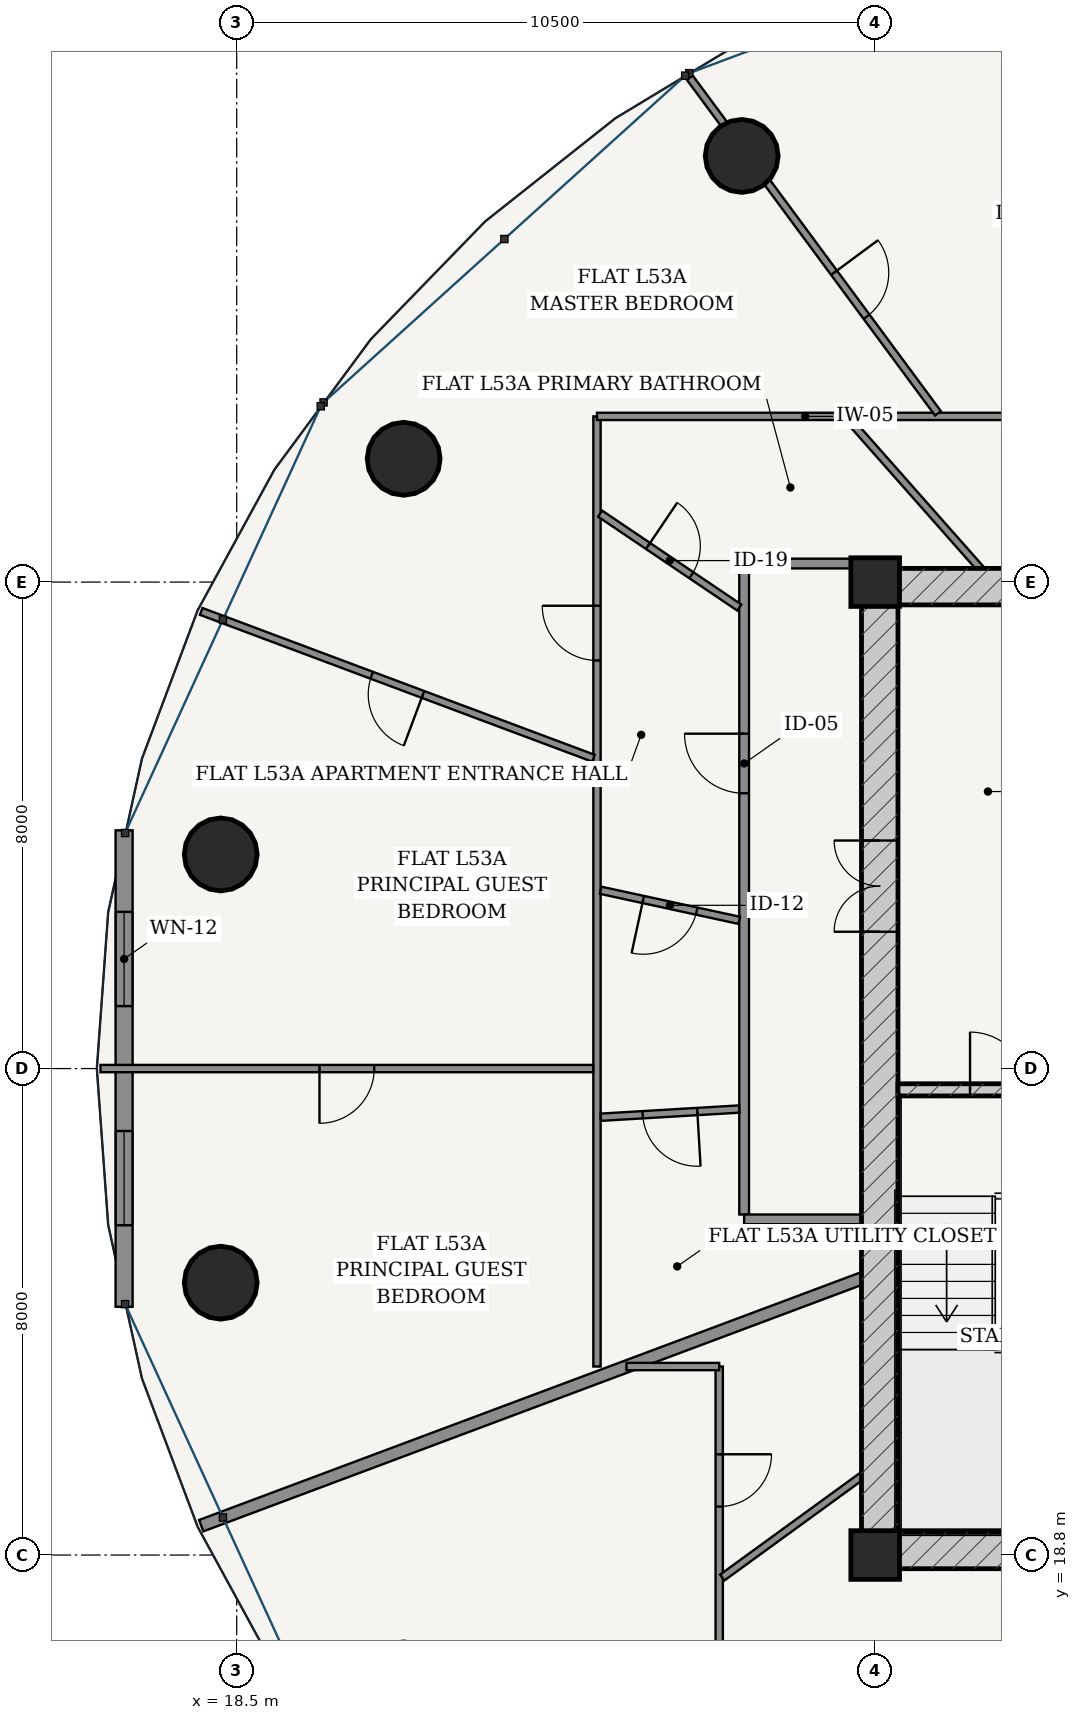
"""IFC4 building model, lengths in metres.
Left out: names, types, materials, properties, quantities, classifications, styles, units other than length and angle.
Written with IfcOpenShell. Run it as: python <this file> out.ifc"""

import sys

from ifc_helpers import new_model, si_unit, direction, frame, frame_2d, origin, origin_2d, place, context, subcontext, project, spatial, rectangle, hollow_circle, extrude, source, transform, mapped, element, fill, save


model = new_model("IFC4")
c1 = context("Model", 3, precision=1e-05, world=origin(), true_north=direction((-0.2419218956, 0.970295726276)))
c2 = subcontext(c1, "Body", "Model", "MODEL_VIEW")
j1 = project(units=[si_unit("LENGTHUNIT", "METRE"), si_unit("PLANEANGLEUNIT", "RADIAN")], contexts=[c1])
p1 = place(None, origin())
s1 = spatial("IfcSite", under=j1, at=p1, CompositionType="ELEMENT")
p2 = place(p1, origin())
s2 = spatial("IfcBuilding", under=s1, at=p2, CompositionType="ELEMENT")
p3 = place(p2, frame((0.0, 0.0, 202.3)))
s3 = spatial("IfcBuildingStorey", under=s2, at=p3, CompositionType="ELEMENT", Elevation=202.3)
for number, where, z_axis, x_axis in (
    (1, (29.0, 18.8, 0.0), (0.0, 0.0, 1.0), (1.0, 0.0, 0.0)),
    (2, (29.0, 34.8, 0.0), (0.0, 0.0, 1.0), (1.0, 0.0, 0.0)),
):
    element("IfcColumn", number, at=place(p3, frame(where, z_axis=z_axis, x_axis=x_axis)), inside=s3, PredefinedType="COLUMN", context=c2, shape_type="SweptSolid", body=[
        extrude(rectangle(XDim=0.8, YDim=0.8, at=origin_2d()), origin(), (0.0, 0.0, 1.0), 3.7),
    ])
p4 = place(p3, frame((28.775, 18.875, 0.0), z_axis=(0.0, 0.0, 1.0), x_axis=(1.0, 0.0, 0.0)))
e3 = element("IfcWall", 3, at=p4, inside=s3, PredefinedType="SHEAR", context=c2, shape_type="SweptSolid", body=[
    extrude(rectangle(XDim=18.45, YDim=0.6, at=frame_2d((9.225, 0.0))), origin(), (0.0, 0.0, 1.0), 3.435),
])
p5 = place(p4, frame((6.76, 0.0, 0.0)))
e4 = element("IfcOpeningElement", 4, at=p5, cuts=e3, PredefinedType="OPENING", context=c2, shape_type="SweptSolid", body=[
    extrude(rectangle(XDim=0.85, YDim=2.1, at=frame_2d((0.425, 1.05))), frame((0.0, 0.31, 0.0), z_axis=(0.0, -1.0, 0.0), x_axis=(1.0, 0.0, 0.0)), (0.0, 0.0, 1.0), 0.62),
])
p6 = place(p4, frame((8.8, 0.0, 0.0)))
e5 = element("IfcOpeningElement", 5, at=p6, cuts=e3, PredefinedType="OPENING", context=c2, shape_type="SweptSolid", body=[
    extrude(rectangle(XDim=0.85, YDim=2.1, at=frame_2d((0.425, 1.05))), frame((0.0, 0.31, 0.0), z_axis=(0.0, -1.0, 0.0), x_axis=(1.0, 0.0, 0.0)), (0.0, 0.0, 1.0), 0.62),
])
p7 = place(p4, frame((10.84, 0.0, 0.0)))
e6 = element("IfcOpeningElement", 6, at=p7, cuts=e3, PredefinedType="OPENING", context=c2, shape_type="SweptSolid", body=[
    extrude(rectangle(XDim=0.85, YDim=2.1, at=frame_2d((0.425, 1.05))), frame((0.0, 0.31, 0.0), z_axis=(0.0, -1.0, 0.0), x_axis=(1.0, 0.0, 0.0)), (0.0, 0.0, 1.0), 0.62),
])
p8 = place(p3, frame((28.775, 34.725, 0.0), z_axis=(0.0, 0.0, 1.0), x_axis=(1.0, 0.0, 0.0)))
e7 = element("IfcWall", 7, at=p8, inside=s3, PredefinedType="SHEAR", context=c2, shape_type="SweptSolid", body=[
    extrude(rectangle(XDim=18.45, YDim=0.6, at=frame_2d((9.225, 0.0))), origin(), (0.0, 0.0, 1.0), 3.435),
])
p9 = place(p3, frame((29.075, 19.175, 0.0), z_axis=(0.0, 0.0, 1.0), x_axis=(0.0, 1.0, 0.0)))
e8 = element("IfcWall", 8, at=p9, inside=s3, PredefinedType="SHEAR", context=c2, shape_type="SweptSolid", body=[
    extrude(rectangle(XDim=15.25, YDim=0.6, at=frame_2d((7.625, 0.0))), origin(), (0.0, 0.0, 1.0), 3.435),
])
p10 = place(p9, frame((9.875, 0.0, 0.0)))
e9 = element("IfcOpeningElement", 9, at=p10, cuts=e8, PredefinedType="OPENING", context=c2, shape_type="SweptSolid", body=[
    extrude(rectangle(XDim=1.5, YDim=2.2, at=frame_2d((0.75, 1.1))), frame((0.0, 0.31, 0.0), z_axis=(0.0, -1.0, 0.0), x_axis=(1.0, 0.0, 0.0)), (0.0, 0.0, 1.0), 0.62),
])
p11 = place(p3, frame((29.375, 26.45, 0.0), z_axis=(0.0, 0.0, 1.0), x_axis=(1.0, 0.0, 0.0)))
e10 = element("IfcWall", 10, at=p11, inside=s3, PredefinedType="SOLIDWALL", context=c2, shape_type="SweptSolid", body=[
    extrude(rectangle(XDim=3.32, YDim=0.2, at=frame_2d((1.66, 0.0))), origin(), (0.0, 0.0, 1.0), 3.435),
])
p12 = place(p11, frame((1.185, 0.0, 0.0)))
e11 = element("IfcOpeningElement", 11, at=p12, cuts=e10, PredefinedType="OPENING", context=c2, shape_type="SweptSolid", body=[
    extrude(rectangle(XDim=0.95, YDim=2.15, at=frame_2d((0.475, 1.075))), frame((0.0, 0.11, 0.0), z_axis=(0.0, -1.0, 0.0), x_axis=(1.0, 0.0, 0.0)), (0.0, 0.0, 1.0), 0.22),
])
for number, where, z_axis, x_axis in (
    (12, (26.805, 41.808, 0.0), (0.0, 0.0, 1.0), (1.0, 0.0, 0.0)),
    (13, (21.246, 36.828, 0.0), (0.0, 0.0, 1.0), (1.0, 0.0, 0.0)),
    (14, (18.237, 30.321, 0.0), (0.0, 0.0, 1.0), (1.0, 0.0, 0.0)),
    (15, (18.237, 23.279, 0.0), (0.0, 0.0, 1.0), (1.0, 0.0, 0.0)),
):
    element("IfcColumn", number, at=place(p3, frame(where, z_axis=z_axis, x_axis=x_axis)), inside=s3, PredefinedType="COLUMN", context=c2, shape_type="SweptSolid", body=[
        extrude(hollow_circle(Radius=0.6, WallThickness=0.038, at=origin_2d()), origin(), (0.0, 0.0, 1.0), 3.7),
    ])
p13 = place(p3, frame((16.648, 30.718, 0.0), z_axis=(0.0, 0.0, 1.0), x_axis=(0.0, -1.0, 0.0)))
e16 = element("IfcWall", 16, at=p13, inside=s3, PredefinedType="SOLIDWALL", context=c2, shape_type="SweptSolid", body=[
    extrude(rectangle(XDim=7.835, YDim=0.28, at=frame_2d((3.917, 0.0))), origin(), (0.0, 0.0, 1.0), 3.435),
])
p14 = place(p13, frame((1.34, 0.0, 0.85)))
e17 = element("IfcOpeningElement", 17, at=p14, cuts=e16, PredefinedType="OPENING", context=c2, shape_type="SweptSolid", body=[
    extrude(rectangle(XDim=1.55, YDim=1.95, at=frame_2d((0.775, 0.975))), frame((0.0, 0.15, 0.0), z_axis=(0.0, -1.0, 0.0), x_axis=(1.0, 0.0, 0.0)), (0.0, 0.0, 1.0), 0.3),
])
p15 = place(p13, frame((4.944, 0.0, 0.85)))
e18 = element("IfcOpeningElement", 18, at=p15, cuts=e16, PredefinedType="OPENING", context=c2, shape_type="SweptSolid", body=[
    extrude(rectangle(XDim=1.55, YDim=1.95, at=frame_2d((0.775, 0.975))), frame((0.0, 0.15, 0.0), z_axis=(0.0, -1.0, 0.0), x_axis=(1.0, 0.0, 0.0)), (0.0, 0.0, 1.0), 0.3),
])
p16 = place(p3, frame((26.845, 24.4, 0.0), z_axis=(0.0, 0.0, 1.0), x_axis=(0.0, 1.0, 0.0)))
e19 = element("IfcWall", 19, at=p16, inside=s3, PredefinedType="PARTITIONING", context=c2, shape_type="SweptSolid", body=[
    extrude(rectangle(XDim=10.625, YDim=0.16, at=frame_2d((5.312, 0.0))), origin(), (0.0, 0.0, 1.0), 2.951),
])
p17 = place(p16, frame((6.927, 0.0, 0.0)))
e20 = element("IfcOpeningElement", 20, at=p17, cuts=e19, PredefinedType="OPENING", context=c2, shape_type="SweptSolid", body=[
    extrude(rectangle(XDim=0.98, YDim=2.2, at=frame_2d((0.49, 1.1))), frame((0.0, 0.09, 0.0), z_axis=(0.0, -1.0, 0.0), x_axis=(1.0, 0.0, 0.0)), (0.0, 0.0, 1.0), 0.18),
])
for number, where, z_axis, x_axis in (
    (21, (26.845, 35.105, 0.0), (0.0, 0.0, 1.0), (1.0, 0.0, 0.0)),
    (22, (26.845, 24.32, 0.0), (0.0, 0.0, 1.0), (1.0, 0.0, 0.0)),
):
    element("IfcWall", number, at=place(p3, frame(where, z_axis=z_axis, x_axis=x_axis)), inside=s3, PredefinedType="PARTITIONING", context=c2, shape_type="SweptSolid", body=[
        extrude(rectangle(XDim=1.93, YDim=0.16, at=frame_2d((0.965, 0.0))), origin(), (0.0, 0.0, 1.0), 3.435),
    ])
p18 = place(p3, frame((24.425, 21.9, 0.0), z_axis=(0.0, 0.0, 1.0), x_axis=(0.0, 1.0, 0.0)))
e23 = element("IfcWall", 23, at=p18, inside=s3, PredefinedType="PARTITIONING", context=c2, shape_type="SweptSolid", body=[
    extrude(rectangle(XDim=15.625, YDim=0.12, at=frame_2d((7.812, 0.0))), origin(), (0.0, 0.0, 1.0), 2.951),
])
p19 = place(p18, frame((11.611, 0.0, 0.0)))
e24 = element("IfcOpeningElement", 24, at=p19, cuts=e23, PredefinedType="OPENING", context=c2, shape_type="SweptSolid", body=[
    extrude(rectangle(XDim=0.9, YDim=2.15, at=frame_2d((0.45, 1.075))), frame((0.0, 0.07, 0.0), z_axis=(0.0, -1.0, 0.0), x_axis=(1.0, 0.0, 0.0)), (0.0, 0.0, 1.0), 0.14),
])
p20 = place(p3, frame((24.425, 37.525, 0.0), z_axis=(0.0, 0.0, 1.0), x_axis=(1.0, 0.0, 0.0)))
e25 = element("IfcWall", 25, at=p20, inside=s3, PredefinedType="PARTITIONING", context=c2, shape_type="SweptSolid", body=[
    extrude(rectangle(XDim=6.85, YDim=0.12, at=frame_2d((3.425, 0.0))), origin(), (0.0, 0.0, 1.0), 2.951),
])
p21 = place(p3, frame((30.033, 37.575, 0.0), z_axis=(0.0, 0.0, 1.0), x_axis=(-0.59452500855, 0.804077119565, 0.0)))
e26 = element("IfcWall", 26, at=p21, inside=s3, PredefinedType="PARTITIONING", context=c2, shape_type="SweptSolid", body=[
    extrude(rectangle(XDim=6.867, YDim=0.12, at=frame_2d((3.434, 0.0))), origin(), (0.0, 0.0, 1.0), 2.951),
])
p22 = place(p21, frame((1.976, 0.0, 0.0)))
e27 = element("IfcOpeningElement", 27, at=p22, cuts=e26, PredefinedType="OPENING", context=c2, shape_type="SweptSolid", body=[
    extrude(rectangle(XDim=0.9, YDim=2.15, at=frame_2d((0.45, 1.075))), frame((0.0, 0.07, 0.0), z_axis=(0.0, -1.0, 0.0), x_axis=(1.0, 0.0, 0.0)), (0.0, 0.0, 1.0), 0.14),
])
p23 = place(p3, frame((24.367, 31.903, 0.0), z_axis=(0.0, 0.0, 1.0), x_axis=(-0.936544604529, 0.350548432785, 0.0)))
e28 = element("IfcWall", 28, at=p23, inside=s3, PredefinedType="PARTITIONING", context=c2, shape_type="SweptSolid", body=[
    extrude(rectangle(XDim=6.887, YDim=0.12, at=frame_2d((3.444, 0.0))), origin(), (0.0, 0.0, 1.0), 2.951),
])
p24 = place(p23, frame((2.994, 0.0, 0.0)))
e29 = element("IfcOpeningElement", 29, at=p24, cuts=e28, PredefinedType="OPENING", context=c2, shape_type="SweptSolid", body=[
    extrude(rectangle(XDim=0.9, YDim=2.15, at=frame_2d((0.45, 1.075))), frame((0.0, 0.07, 0.0), z_axis=(0.0, -1.0, 0.0), x_axis=(1.0, 0.0, 0.0)), (0.0, 0.0, 1.0), 0.14),
])
p25 = place(p3, frame((24.363, 26.8, 0.0), z_axis=(0.0, 0.0, 1.0), x_axis=(-1.0, 0.0, 0.0)))
e30 = element("IfcWall", 30, at=p25, inside=s3, PredefinedType="PARTITIONING", context=c2, shape_type="SweptSolid", body=[
    extrude(rectangle(XDim=8.103, YDim=0.12, at=frame_2d((4.052, 0.0))), origin(), (0.0, 0.0, 1.0), 2.951),
])
p26 = place(p25, frame((3.602, 0.0, 0.0)))
e31 = element("IfcOpeningElement", 31, at=p26, cuts=e30, PredefinedType="OPENING", context=c2, shape_type="SweptSolid", body=[
    extrude(rectangle(XDim=0.9, YDim=2.15, at=frame_2d((0.45, 1.075))), frame((0.0, 0.07, 0.0), z_axis=(0.0, -1.0, 0.0), x_axis=(1.0, 0.0, 0.0)), (0.0, 0.0, 1.0), 0.14),
])
p27 = place(p3, frame((30.726, 35.027, 0.0), z_axis=(0.0, 0.0, 1.0), x_axis=(-0.662398427862, 0.749151735475, 0.0)))
e32 = element("IfcWall", 32, at=p27, inside=s3, PredefinedType="PARTITIONING", context=c2, shape_type="SweptSolid", body=[
    extrude(rectangle(XDim=3.273, YDim=0.12, at=frame_2d((1.636, 0.0))), origin(), (0.0, 0.0, 1.0), 3.435),
])
p28 = place(p3, frame((26.765, 34.381, 0.0), z_axis=(0.0, 0.0, 1.0), x_axis=(-0.828908126494, 0.55938476725, 0.0)))
e33 = element("IfcWall", 33, at=p28, inside=s3, PredefinedType="PARTITIONING", context=c2, shape_type="SweptSolid", body=[
    extrude(rectangle(XDim=2.761, YDim=0.12, at=frame_2d((1.38, 0.0))), origin(), (0.0, 0.0, 1.0), 3.11),
])
p29 = place(p28, frame((0.95, 0.0, 0.0)))
e34 = element("IfcOpeningElement", 34, at=p29, cuts=e33, PredefinedType="OPENING", context=c2, shape_type="SweptSolid", body=[
    extrude(rectangle(XDim=0.86, YDim=2.15, at=frame_2d((0.43, 1.075))), frame((0.0, 0.07, 0.0), z_axis=(0.0, -1.0, 0.0), x_axis=(1.0, 0.0, 0.0)), (0.0, 0.0, 1.0), 0.14),
])
p30 = place(p3, frame((26.765, 29.238, 0.0), z_axis=(0.0, 0.0, 1.0), x_axis=(-0.977275456013, 0.211973307458, 0.0)))
e35 = element("IfcWall", 35, at=p30, inside=s3, PredefinedType="PARTITIONING", context=c2, shape_type="SweptSolid", body=[
    extrude(rectangle(XDim=2.332, YDim=0.12, at=frame_2d((1.166, 0.0))), origin(), (0.0, 0.0, 1.0), 3.435),
])
p31 = place(p30, frame((0.716, 0.0, 0.0)))
e36 = element("IfcOpeningElement", 36, at=p31, cuts=e35, PredefinedType="OPENING", context=c2, shape_type="SweptSolid", body=[
    extrude(rectangle(XDim=0.9, YDim=2.15, at=frame_2d((0.45, 1.075))), frame((0.0, 0.07, 0.0), z_axis=(0.0, -1.0, 0.0), x_axis=(1.0, 0.0, 0.0)), (0.0, 0.0, 1.0), 0.14),
])
p32 = place(p3, frame((26.765, 26.135, 0.0), z_axis=(0.0, 0.0, 1.0), x_axis=(-0.998248453424, -0.059161011118, 0.0)))
e37 = element("IfcWall", 37, at=p32, inside=s3, PredefinedType="PARTITIONING", context=c2, shape_type="SweptSolid", body=[
    extrude(rectangle(XDim=2.282, YDim=0.12, at=frame_2d((1.141, 0.0))), origin(), (0.0, 0.0, 1.0), 3.435),
])
p33 = place(p32, frame((0.691, 0.0, 0.0)))
e38 = element("IfcOpeningElement", 38, at=p33, cuts=e37, PredefinedType="OPENING", context=c2, shape_type="SweptSolid", body=[
    extrude(rectangle(XDim=0.9, YDim=2.15, at=frame_2d((0.45, 1.075))), frame((0.0, 0.07, 0.0), z_axis=(0.0, -1.0, 0.0), x_axis=(1.0, 0.0, 0.0)), (0.0, 0.0, 1.0), 0.14),
])
p34 = place(p3, frame((28.775, 23.347, 0.0), z_axis=(0.0, 0.0, 1.0), x_axis=(-0.936537569358, -0.350567227761, 0.0)))
e39 = element("IfcWall", 39, at=p34, inside=s3, PredefinedType="PARTITIONING", context=c2, shape_type="SweptSolid", body=[
    extrude(rectangle(XDim=11.594, YDim=0.2, at=frame_2d((5.797, 0.0))), origin(), (0.0, 0.0, 1.0), 2.951),
])
p35 = place(p3, frame((26.435, 16.235, 0.0), z_axis=(0.0, 0.0, 1.0), x_axis=(0.0, 1.0, 0.0)))
e40 = element("IfcWall", 40, at=p35, inside=s3, PredefinedType="PARTITIONING", context=c2, shape_type="SweptSolid", body=[
    extrude(rectangle(XDim=5.665, YDim=0.12, at=frame_2d((2.833, 0.0))), origin(), (0.0, 0.0, 1.0), 2.951),
])
p36 = place(p35, frame((3.362, 0.0, 0.0)))
e41 = element("IfcOpeningElement", 41, at=p36, cuts=e40, PredefinedType="OPENING", context=c2, shape_type="SweptSolid", body=[
    extrude(rectangle(XDim=0.86, YDim=2.15, at=frame_2d((0.43, 1.075))), frame((0.0, 0.07, 0.0), z_axis=(0.0, -1.0, 0.0), x_axis=(1.0, 0.0, 0.0)), (0.0, 0.0, 1.0), 0.14),
])
p37 = place(p3, frame((26.435, 21.9, 0.0), z_axis=(0.0, 0.0, 1.0), x_axis=(-1.0, 0.0, 0.0)))
e42 = element("IfcWall", 42, at=p37, inside=s3, PredefinedType="PARTITIONING", context=c2, shape_type="SweptSolid", body=[
    extrude(rectangle(XDim=1.526, YDim=0.12, at=frame_2d((0.763, 0.0))), origin(), (0.0, 0.0, 1.0), 3.435),
])
p38 = place(p3, frame((28.775, 20.094, 0.0), z_axis=(0.0, 0.0, 1.0), x_axis=(-0.808862864425, -0.587997335499, 0.0)))
e43 = element("IfcWall", 43, at=p38, inside=s3, PredefinedType="PARTITIONING", context=c2, shape_type="SweptSolid", body=[
    extrude(rectangle(XDim=2.831, YDim=0.12, at=frame_2d((1.416, 0.0))), origin(), (0.0, 0.0, 1.0), 3.435),
])
m1 = source(origin(), c2, "Body", "SweptSolid", [
    extrude(rectangle(XDim=1.55, YDim=1.95, at=frame_2d((0.775, 0.975))), frame((0.0, 0.03, 0.0), z_axis=(0.0, -1.0, 0.0), x_axis=(1.0, 0.0, 0.0)), (0.0, 0.0, 1.0), 0.06),
])
p39 = place(p14, origin())
e44 = element("IfcWindow", 44, at=p39, inside=s3, PartitioningType="SINGLE_PANEL", PredefinedType="WINDOW", context=c2, shape_type="MappedRepresentation", body=[
    mapped(m1, transform((0.0, 0.0, 0.0), scale=1.0)),
])
fill(e17, e44)
p40 = place(p15, origin())
e45 = element("IfcWindow", 45, at=p40, inside=s3, PartitioningType="SINGLE_PANEL", PredefinedType="WINDOW", context=c2, shape_type="MappedRepresentation", body=[
    mapped(m1, transform((0.0, 0.0, 0.0), scale=1.0)),
])
fill(e18, e45)
m2 = source(origin(), c2, "Body", "SweptSolid", [
    extrude(rectangle(XDim=1.5, YDim=2.2, at=frame_2d((0.75, 1.1))), frame((0.0, 0.025, 0.0), z_axis=(0.0, -1.0, 0.0), x_axis=(1.0, 0.0, 0.0)), (0.0, 0.0, 1.0), 0.05),
])
p41 = place(p10, origin())
e46 = element("IfcDoor", 46, at=p41, inside=s3, OperationType="DOUBLE_DOOR_SINGLE_SWING", PredefinedType="DOOR", context=c2, shape_type="MappedRepresentation", body=[
    mapped(m2, transform((0.0, 0.0, 0.0), scale=1.0)),
])
fill(e9, e46)
m3 = source(origin(), c2, "Body", "SweptSolid", [
    extrude(rectangle(XDim=0.95, YDim=2.15, at=frame_2d((0.475, 1.075))), frame((0.0, 0.025, 0.0), z_axis=(0.0, -1.0, 0.0), x_axis=(1.0, 0.0, 0.0)), (0.0, 0.0, 1.0), 0.05),
])
p42 = place(p12, origin())
e47 = element("IfcDoor", 47, at=p42, inside=s3, OperationType="SINGLE_SWING_LEFT", PredefinedType="DOOR", context=c2, shape_type="MappedRepresentation", body=[
    mapped(m3, transform((0.0, 0.0, 0.0), scale=1.0)),
])
fill(e11, e47)
m4 = source(origin(), c2, "Body", "SweptSolid", [
    extrude(rectangle(XDim=0.98, YDim=2.2, at=frame_2d((0.49, 1.1))), frame((0.0, 0.025, 0.0), z_axis=(0.0, -1.0, 0.0), x_axis=(1.0, 0.0, 0.0)), (0.0, 0.0, 1.0), 0.05),
])
p43 = place(p17, origin())
e48 = element("IfcDoor", 48, at=p43, inside=s3, OperationType="SINGLE_SWING_RIGHT", PredefinedType="DOOR", context=c2, shape_type="MappedRepresentation", body=[
    mapped(m4, transform((0.0, 0.0, 0.0), scale=1.0)),
])
fill(e20, e48)
m5 = source(origin(), c2, "Body", "SweptSolid", [
    extrude(rectangle(XDim=0.86, YDim=2.15, at=frame_2d((0.43, 1.075))), frame((0.0, 0.025, 0.0), z_axis=(0.0, -1.0, 0.0), x_axis=(1.0, 0.0, 0.0)), (0.0, 0.0, 1.0), 0.05),
])
p44 = place(p29, frame((0.86, 0.0, 0.0), z_axis=(0.0, 0.0, 1.0), x_axis=(-1.0, 0.0, 0.0)))
e49 = element("IfcDoor", 49, at=p44, inside=s3, OperationType="SINGLE_SWING_LEFT", PredefinedType="DOOR", context=c2, shape_type="MappedRepresentation", body=[
    mapped(m5, transform((0.0, 0.0, 0.0), scale=1.0)),
])
fill(e34, e49)
m6 = source(origin(), c2, "Body", "SweptSolid", [
    extrude(rectangle(XDim=0.9, YDim=2.15, at=frame_2d((0.45, 1.075))), frame((0.0, 0.025, 0.0), z_axis=(0.0, -1.0, 0.0), x_axis=(1.0, 0.0, 0.0)), (0.0, 0.0, 1.0), 0.05),
])
p45 = place(p31, origin())
e50 = element("IfcDoor", 50, at=p45, inside=s3, OperationType="SINGLE_SWING_RIGHT", PredefinedType="DOOR", context=c2, shape_type="MappedRepresentation", body=[
    mapped(m6, transform((0.0, 0.0, 0.0), scale=1.0)),
])
fill(e36, e50)
p46 = place(p33, origin())
e51 = element("IfcDoor", 51, at=p46, inside=s3, OperationType="SINGLE_SWING_LEFT", PredefinedType="DOOR", context=c2, shape_type="MappedRepresentation", body=[
    mapped(m6, transform((0.0, 0.0, 0.0), scale=1.0)),
])
fill(e38, e51)
p47 = place(p19, origin())
e52 = element("IfcDoor", 52, at=p47, inside=s3, OperationType="SINGLE_SWING_RIGHT", PredefinedType="DOOR", context=c2, shape_type="MappedRepresentation", body=[
    mapped(m6, transform((0.0, 0.0, 0.0), scale=1.0)),
])
fill(e24, e52)
p48 = place(p24, origin())
e53 = element("IfcDoor", 53, at=p48, inside=s3, OperationType="SINGLE_SWING_LEFT", PredefinedType="DOOR", context=c2, shape_type="MappedRepresentation", body=[
    mapped(m6, transform((0.0, 0.0, 0.0), scale=1.0)),
])
fill(e29, e53)
p49 = place(p26, origin())
e54 = element("IfcDoor", 54, at=p49, inside=s3, OperationType="SINGLE_SWING_RIGHT", PredefinedType="DOOR", context=c2, shape_type="MappedRepresentation", body=[
    mapped(m6, transform((0.0, 0.0, 0.0), scale=1.0)),
])
fill(e31, e54)
p50 = place(p22, frame((0.9, 0.0, 0.0), z_axis=(0.0, 0.0, 1.0), x_axis=(-1.0, 0.0, 0.0)))
e55 = element("IfcDoor", 55, at=p50, inside=s3, OperationType="SINGLE_SWING_LEFT", PredefinedType="DOOR", context=c2, shape_type="MappedRepresentation", body=[
    mapped(m6, transform((0.0, 0.0, 0.0), scale=1.0)),
])
fill(e27, e55)
p51 = place(p36, frame((0.86, 0.0, 0.0), z_axis=(0.0, 0.0, 1.0), x_axis=(-1.0, 0.0, 0.0)))
e56 = element("IfcDoor", 56, at=p51, inside=s3, OperationType="SINGLE_SWING_LEFT", PredefinedType="DOOR", context=c2, shape_type="MappedRepresentation", body=[
    mapped(m5, transform((0.0, 0.0, 0.0), scale=1.0)),
])
fill(e41, e56)
save(model, sys.argv[1])
